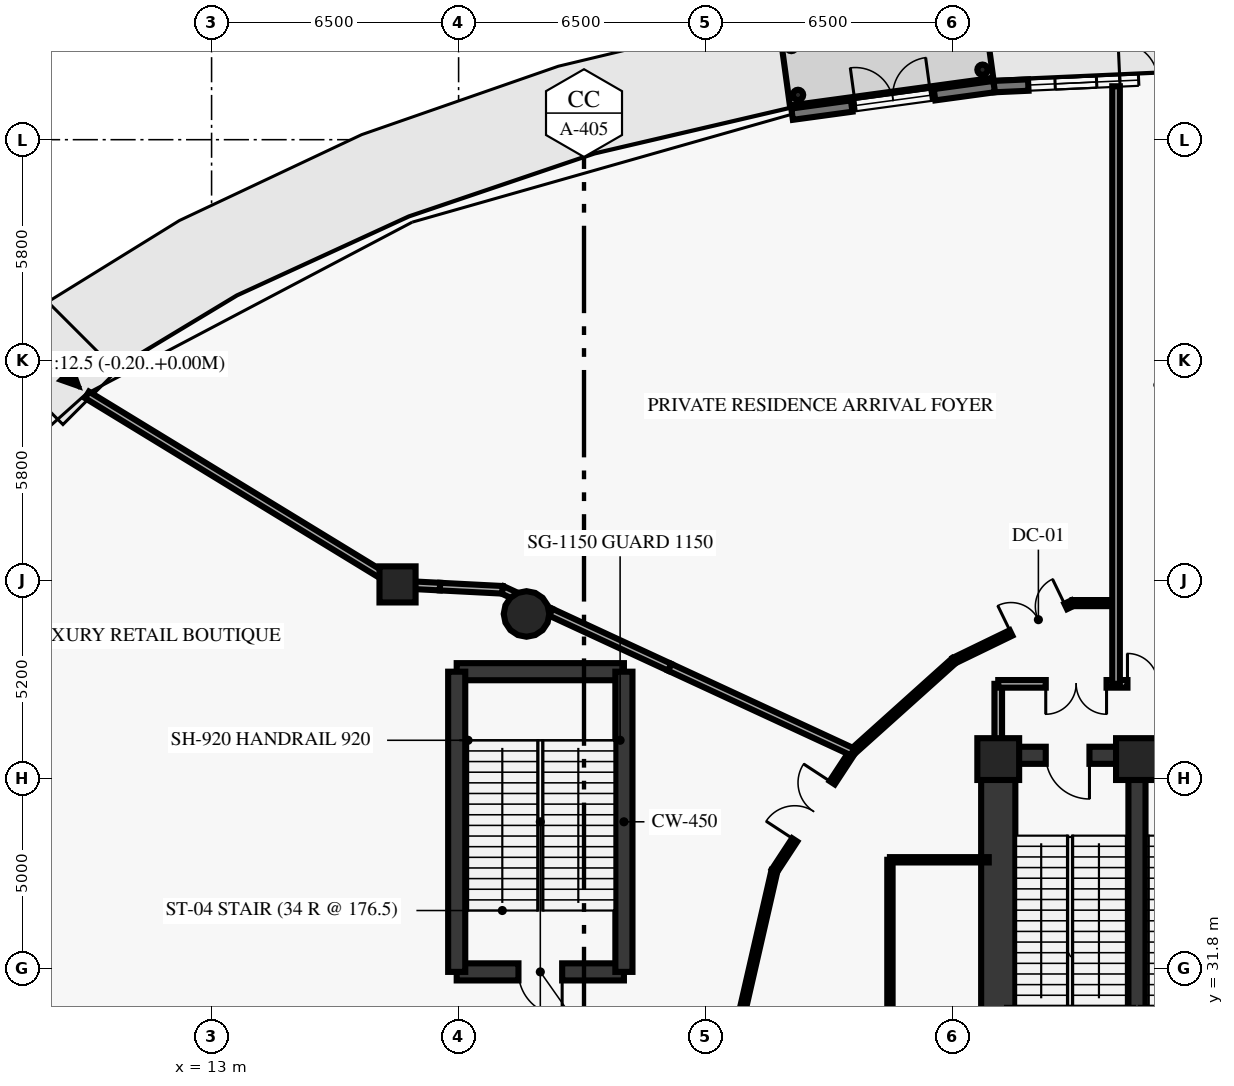
"""IFC4 building model, lengths in metres.
Left out: names, types, materials, properties, quantities, classifications, styles, units other than length and angle.
Written with IfcOpenShell. Run it as: python <this file> out.ifc"""

import sys

from ifc_helpers import new_model, si_unit, direction, frame, frame_2d, origin, origin_2d, place, context, subcontext, project, spatial, rectangle, circle, hollow_circle, extrude, element, fill, save


model = new_model("IFC4")
c1 = context("Model", 3, precision=1e-05, world=origin(), true_north=direction((0.0, 1.0)))
c2 = subcontext(c1, "Body", "Model", "MODEL_VIEW")
j1 = project(units=[si_unit("LENGTHUNIT", "METRE"), si_unit("PLANEANGLEUNIT", "RADIAN")], contexts=[c1])
p1 = place(None, origin())
s1 = spatial("IfcSite", under=j1, at=p1, CompositionType="ELEMENT")
p2 = place(p1, origin())
s2 = spatial("IfcBuilding", under=s1, at=p2, CompositionType="ELEMENT")
p3 = place(p2, origin())
s3 = spatial("IfcBuildingStorey", under=s2, at=p3, CompositionType="ELEMENT", Elevation=0.0)
for number, where, z_axis, x_axis in (
    (1, (37.35, 37.3, 0.0), (0.0, 0.0, 1.0), (1.0, 0.0, 0.0)),
    (2, (33.7, 37.3, 0.0), (0.0, 0.0, 1.0), (1.0, 0.0, 0.0)),
):
    element("IfcColumn", number, at=place(p3, frame(where, z_axis=z_axis, x_axis=x_axis)), inside=s3, PredefinedType="PILASTER", context=c2, shape_type="SweptSolid", body=[
        extrude(rectangle(XDim=1.1, YDim=1.1, at=origin_2d()), origin(), (0.0, 0.0, 1.0), 5.7),
    ])
p4 = place(p3, frame((21.287, 41.119, 0.0), z_axis=(0.0, 0.0, 1.0), x_axis=(1.0, 0.0, 0.0)))
e3 = element("IfcColumn", 3, at=p4, inside=s3, PredefinedType="COLUMN", context=c2, shape_type="SweptSolid", body=[
    extrude(circle(Radius=0.6, at=origin_2d()), origin(), (0.0, 0.0, 1.0), 5.7),
])
p5 = place(p3, frame((17.893, 41.897, 0.0), z_axis=(0.0, 0.0, 1.0), x_axis=(1.0, 0.0, 0.0)))
e4 = element("IfcColumn", 4, at=p5, inside=s3, PredefinedType="COLUMN", context=c2, shape_type="SweptSolid", body=[
    extrude(rectangle(XDim=0.95, YDim=0.95, at=origin_2d()), origin(), (0.0, 0.0, 1.0), 5.7),
])
p6 = place(p3, frame((33.7, 29.05, 0.0), z_axis=(0.0, 0.0, 1.0), x_axis=(0.0, 1.0, 0.0)))
e5 = element("IfcWall", 5, at=p6, inside=s3, PredefinedType="SHEAR", context=c2, shape_type="SweptSolid", body=[
    extrude(rectangle(XDim=8.35, YDim=0.9, at=frame_2d((4.175, 0.0))), origin(), (0.0, 0.0, 1.0), 5.7),
])
p7 = place(p3, frame((33.591, 54.997, 0.0), z_axis=(0.0, 0.0, 1.0), x_axis=(0.998993030562, 0.044865631479, 0.0)))
e6 = element("IfcWall", 6, at=p7, inside=s3, PredefinedType="STANDARD", context=c2, shape_type="SweptSolid", body=[
    extrude(rectangle(XDim=5.414, YDim=0.3, at=frame_2d((2.707, 0.0))), origin(), (0.0, 0.0, 1.0), 5.7),
])
p8 = place(p7, frame((0.9, 0.0, 0.9)))
e7 = element("IfcOpeningElement", 7, at=p8, cuts=e6, PredefinedType="OPENING", context=c2, shape_type="SweptSolid", body=[
    extrude(rectangle(XDim=1.8, YDim=2.4, at=frame_2d((0.9, 1.2))), frame((0.0, 0.16, 0.0), z_axis=(0.0, -1.0, 0.0), x_axis=(1.0, 0.0, 0.0)), (0.0, 0.0, 1.0), 0.32),
])
p9 = place(p7, frame((3.312, 0.0, 0.0)))
e8 = element("IfcOpeningElement", 8, at=p9, cuts=e6, PredefinedType="OPENING", context=c2, shape_type="SweptSolid", body=[
    extrude(rectangle(XDim=2.0, YDim=2.4, at=frame_2d((1.0, 1.2))), frame((0.0, 0.16, 0.0), z_axis=(0.0, -1.0, 0.0), x_axis=(1.0, 0.0, 0.0)), (0.0, 0.0, 1.0), 0.32),
])
p10 = place(p7, frame((1.607, 0.0, 3.4)))
e9 = element("IfcOpeningElement", 9, at=p10, cuts=e6, PredefinedType="OPENING", context=c2, shape_type="SweptSolid", body=[
    extrude(rectangle(XDim=2.2, YDim=1.3, at=frame_2d((1.1, 0.65))), frame((0.0, 0.16, 0.0), z_axis=(0.0, -1.0, 0.0), x_axis=(1.0, 0.0, 0.0)), (0.0, 0.0, 1.0), 0.32),
])
p11 = place(p3, frame((28.275, 54.271, 0.0), z_axis=(0.0, 0.0, 1.0), x_axis=(0.99080162659, 0.135322343857, 0.0)))
e10 = element("IfcWall", 10, at=p11, inside=s3, PredefinedType="STANDARD", context=c2, shape_type="SweptSolid", body=[
    extrude(rectangle(XDim=5.365, YDim=0.3, at=frame_2d((2.683, 0.0))), origin(), (0.0, 0.0, 1.0), 5.7),
])
p12 = place(p11, frame((1.683, 0.0, 0.0)))
e11 = element("IfcOpeningElement", 11, at=p12, cuts=e10, PredefinedType="OPENING", context=c2, shape_type="SweptSolid", body=[
    extrude(rectangle(XDim=2.0, YDim=2.4, at=frame_2d((1.0, 1.2))), frame((0.0, 0.16, 0.0), z_axis=(0.0, -1.0, 0.0), x_axis=(1.0, 0.0, 0.0)), (0.0, 0.0, 1.0), 0.32),
])
p13 = place(p11, frame((1.583, 0.0, 3.4)))
e12 = element("IfcOpeningElement", 12, at=p13, cuts=e10, PredefinedType="OPENING", context=c2, shape_type="SweptSolid", body=[
    extrude(rectangle(XDim=2.2, YDim=1.3, at=frame_2d((1.1, 0.65))), frame((0.0, 0.16, 0.0), z_axis=(0.0, -1.0, 0.0), x_axis=(1.0, 0.0, 0.0)), (0.0, 0.0, 1.0), 0.32),
])
for number, where, z_axis, x_axis in (
    (13, (33.286, 55.441, -0.22), (0.0, 0.0, 1.0), (1.0, 0.0, 0.0)),
    (14, (28.431, 54.778, -0.22), (0.0, 0.0, 1.0), (1.0, 0.0, 0.0)),
):
    element("IfcColumn", number, at=place(p3, frame(where, z_axis=z_axis, x_axis=x_axis)), inside=s3, PredefinedType="COLUMN", context=c2, shape_type="SweptSolid", body=[
        extrude(hollow_circle(Radius=0.136, WallThickness=0.013, at=origin_2d()), origin(), (0.0, 0.0, 1.0), 3.47),
    ])
p14 = place(p3, frame((33.7, 37.4, 0.0), z_axis=(0.0, 0.0, 1.0), x_axis=(1.0, 0.0, 0.0)))
e15 = element("IfcWall", 15, at=p14, inside=s3, PredefinedType="SHEAR", context=c2, shape_type="SweptSolid", body=[
    extrude(rectangle(XDim=3.65, YDim=0.45, at=frame_2d((1.825, 0.0))), origin(), (0.0, 0.0, 1.0), 5.7),
])
p15 = place(p14, frame((1.25, 0.0, 0.0)))
e16 = element("IfcOpeningElement", 16, at=p15, cuts=e15, PredefinedType="OPENING", context=c2, shape_type="SweptSolid", body=[
    extrude(rectangle(XDim=1.15, YDim=2.15, at=frame_2d((0.575, 1.075))), frame((0.0, 0.235, 0.0), z_axis=(0.0, -1.0, 0.0), x_axis=(1.0, 0.0, 0.0)), (0.0, 0.0, 1.0), 0.47),
])
p16 = place(p3, frame((37.35, 29.05, 0.0), z_axis=(0.0, 0.0, 1.0), x_axis=(0.0, 1.0, 0.0)))
e17 = element("IfcWall", 17, at=p16, inside=s3, PredefinedType="SHEAR", context=c2, shape_type="SweptSolid", body=[
    extrude(rectangle(XDim=8.35, YDim=0.45, at=frame_2d((4.175, 0.0))), origin(), (0.0, 0.0, 1.0), 5.7),
])
p17 = place(p3, frame((37.35, 37.4, 0.0), z_axis=(0.0, 0.0, 1.0), x_axis=(1.0, 0.0, 0.0)))
e18 = element("IfcWall", 18, at=p17, inside=s3, PredefinedType="SHEAR", context=c2, shape_type="SweptSolid", body=[
    extrude(rectangle(XDim=3.3, YDim=0.45, at=frame_2d((1.65, 0.0))), origin(), (0.0, 0.0, 1.0), 5.7),
])
p18 = place(p17, frame((1.075, 0.0, 0.0)))
e19 = element("IfcOpeningElement", 19, at=p18, cuts=e18, PredefinedType="OPENING", context=c2, shape_type="SweptSolid", body=[
    extrude(rectangle(XDim=1.15, YDim=2.15, at=frame_2d((0.575, 1.075))), frame((0.0, 0.235, 0.0), z_axis=(0.0, -1.0, 0.0), x_axis=(1.0, 0.0, 0.0)), (0.0, 0.0, 1.0), 0.47),
])
p19 = place(p3, frame((23.85, 31.7, 0.0), z_axis=(0.0, 0.0, 1.0), x_axis=(-1.0, 0.0, 0.0)))
e20 = element("IfcWall", 20, at=p19, inside=s3, PredefinedType="SHEAR", context=c2, shape_type="SweptSolid", body=[
    extrude(rectangle(XDim=4.4, YDim=0.45, at=frame_2d((2.2, 0.0))), origin(), (0.0, 0.0, 1.0), 5.7),
])
p20 = place(p19, frame((1.625, 0.0, 0.0)))
e21 = element("IfcOpeningElement", 21, at=p20, cuts=e20, PredefinedType="OPENING", context=c2, shape_type="SweptSolid", body=[
    extrude(rectangle(XDim=1.15, YDim=2.15, at=frame_2d((0.575, 1.075))), frame((0.0, 0.235, 0.0), z_axis=(0.0, -1.0, 0.0), x_axis=(1.0, 0.0, 0.0)), (0.0, 0.0, 1.0), 0.47),
])
p21 = place(p3, frame((19.45, 39.6, 0.0), z_axis=(0.0, 0.0, 1.0), x_axis=(1.0, 0.0, 0.0)))
e22 = element("IfcWall", 22, at=p21, inside=s3, PredefinedType="SHEAR", context=c2, shape_type="SweptSolid", body=[
    extrude(rectangle(XDim=4.4, YDim=0.45, at=frame_2d((2.2, 0.0))), origin(), (0.0, 0.0, 1.0), 5.7),
])
for number, where, z_axis, x_axis in (
    (23, (19.45, 31.7, 0.0), (0.0, 0.0, 1.0), (0.0, 1.0, 0.0)),
    (24, (23.85, 31.7, 0.0), (0.0, 0.0, 1.0), (0.0, 1.0, 0.0)),
):
    element("IfcWall", number, at=place(p3, frame(where, z_axis=z_axis, x_axis=x_axis)), inside=s3, PredefinedType="SHEAR", context=c2, shape_type="SweptSolid", body=[
        extrude(rectangle(XDim=7.9, YDim=0.45, at=frame_2d((3.95, 0.0))), origin(), (0.0, 0.0, 1.0), 5.7),
    ])
p22 = place(p3, frame((33.7, 37.4, 0.0), z_axis=(0.0, 0.0, 1.0), x_axis=(0.0, 1.0, 0.0)))
e25 = element("IfcWall", 25, at=p22, inside=s3, PredefinedType="SOLIDWALL", context=c2, shape_type="SweptSolid", body=[
    extrude(rectangle(XDim=1.88, YDim=0.2, at=frame_2d((0.94, 0.0))), origin(), (0.0, 0.0, 1.0), 5.7),
])
p23 = place(p3, frame((33.7, 39.28, 0.0), z_axis=(0.0, 0.0, 1.0), x_axis=(1.0, 0.0, 0.0)))
e26 = element("IfcWall", 26, at=p23, inside=s3, PredefinedType="SOLIDWALL", context=c2, shape_type="SweptSolid", body=[
    extrude(rectangle(XDim=5.2, YDim=0.2, at=frame_2d((2.6, 0.0))), origin(), (0.0, 0.0, 1.0), 5.7),
])
p24 = place(p23, frame((1.25, 0.0, 0.0)))
e27 = element("IfcOpeningElement", 27, at=p24, cuts=e26, PredefinedType="OPENING", context=c2, shape_type="SweptSolid", body=[
    extrude(rectangle(XDim=1.6, YDim=2.2, at=frame_2d((0.8, 1.1))), frame((0.0, 0.11, 0.0), z_axis=(0.0, -1.0, 0.0), x_axis=(1.0, 0.0, 0.0)), (0.0, 0.0, 1.0), 0.22),
])
p25 = place(p23, frame((3.4, 0.0, 0.0)))
e28 = element("IfcOpeningElement", 28, at=p25, cuts=e26, PredefinedType="OPENING", context=c2, shape_type="SweptSolid", body=[
    extrude(rectangle(XDim=1.6, YDim=2.2, at=frame_2d((0.8, 1.1))), frame((0.0, 0.11, 0.0), z_axis=(0.0, -1.0, 0.0), x_axis=(1.0, 0.0, 0.0)), (0.0, 0.0, 1.0), 0.22),
])
p26 = place(p3, frame((30.85, 34.65, 0.0), z_axis=(0.0, 0.0, 1.0), x_axis=(1.0, 0.0, 0.0)))
e29 = element("IfcWall", 29, at=p26, inside=s3, PredefinedType="PARTITIONING", context=c2, shape_type="SweptSolid", body=[
    extrude(rectangle(XDim=2.6, YDim=0.14, at=frame_2d((1.3, 0.0))), origin(), (0.0, 0.0, 1.0), 5.7),
])
p27 = place(p3, frame((30.85, 29.05, 0.0), z_axis=(0.0, 0.0, 1.0), x_axis=(0.0, 1.0, 0.0)))
e30 = element("IfcWall", 30, at=p27, inside=s3, PredefinedType="PARTITIONING", context=c2, shape_type="SweptSolid", body=[
    extrude(rectangle(XDim=5.6, YDim=0.14, at=frame_2d((2.8, 0.0))), origin(), (0.0, 0.0, 1.0), 5.7),
])
p28 = place(p3, frame((32.54, 39.894, 0.0), z_axis=(0.0, 0.0, 1.0), x_axis=(0.899789784655, 0.436323668199, 0.0)))
e31 = element("IfcWall", 31, at=p28, inside=s3, PredefinedType="PARTITIONING", context=c2, shape_type="SweptSolid", body=[
    extrude(rectangle(XDim=3.463, YDim=0.16, at=frame_2d((1.731, 0.0))), origin(), (0.0, 0.0, 1.0), 5.7),
])
p29 = place(p28, frame((1.663, 0.0, 0.0)))
e32 = element("IfcOpeningElement", 32, at=p29, cuts=e31, PredefinedType="OPENING", context=c2, shape_type="SweptSolid", body=[
    extrude(rectangle(XDim=1.6, YDim=2.2, at=frame_2d((0.8, 1.1))), frame((0.0, 0.09, 0.0), z_axis=(0.0, -1.0, 0.0), x_axis=(1.0, 0.0, 0.0)), (0.0, 0.0, 1.0), 0.18),
])
p30 = place(p3, frame((32.54, 39.894, 0.0), z_axis=(0.0, 0.0, 1.0), x_axis=(-0.744032872127, -0.668143012531, 0.0)))
e33 = element("IfcWall", 33, at=p30, inside=s3, PredefinedType="PARTITIONING", context=c2, shape_type="SweptSolid", body=[
    extrude(rectangle(XDim=3.597, YDim=0.16, at=frame_2d((1.798, 0.0))), origin(), (0.0, 0.0, 1.0), 5.7),
])
p31 = place(p3, frame((27.811, 34.36, 0.0), z_axis=(0.0, 0.0, 1.0), x_axis=(0.548348738977, 0.836249759619, 0.0)))
e34 = element("IfcWall", 34, at=p31, inside=s3, PredefinedType="PARTITIONING", context=c2, shape_type="SweptSolid", body=[
    extrude(rectangle(XDim=3.744, YDim=0.16, at=frame_2d((1.872, 0.0))), origin(), (0.0, 0.0, 1.0), 5.7),
])
p32 = place(p31, frame((0.972, 0.0, 0.0)))
e35 = element("IfcOpeningElement", 35, at=p32, cuts=e34, PredefinedType="OPENING", context=c2, shape_type="SweptSolid", body=[
    extrude(rectangle(XDim=1.8, YDim=2.3, at=frame_2d((0.9, 1.15))), frame((0.0, 0.09, 0.0), z_axis=(0.0, -1.0, 0.0), x_axis=(1.0, 0.0, 0.0)), (0.0, 0.0, 1.0), 0.18),
])
p33 = place(p3, frame((27.811, 34.36, 0.0), z_axis=(0.0, 0.0, 1.0), x_axis=(-0.223185487206, -0.974775993909, 0.0)))
e36 = element("IfcWall", 36, at=p33, inside=s3, PredefinedType="PARTITIONING", context=c2, shape_type="SweptSolid", body=[
    extrude(rectangle(XDim=7.756, YDim=0.16, at=frame_2d((3.878, 0.0))), origin(), (0.0, 0.0, 1.0), 5.7),
])
p34 = place(p3, frame((29.864, 37.491, 0.0), z_axis=(0.0, 0.0, 1.0), x_axis=(-0.907524785669, 0.419998527851, 0.0)))
e37 = element("IfcWall", 37, at=p34, inside=s3, PredefinedType="PARTITIONING", context=c2, shape_type="SweptSolid", body=[
    extrude(rectangle(XDim=5.3, YDim=0.2, at=frame_2d((2.65, 0.0))), origin(), (0.0, 0.0, 1.0), 5.7),
])
p35 = place(p3, frame((25.054, 39.717, 0.0), z_axis=(0.0, 0.0, 1.0), x_axis=(-0.90747190463, 0.420112773321, 0.0)))
e38 = element("IfcWall", 38, at=p35, inside=s3, PredefinedType="PARTITIONING", context=c2, shape_type="SweptSolid", body=[
    extrude(rectangle(XDim=3.449, YDim=0.2, at=frame_2d((1.725, 0.0))), origin(), (0.0, 0.0, 1.0), 4.92),
])
p36 = place(p3, frame((21.924, 41.166, 0.0), z_axis=(0.0, 0.0, 1.0), x_axis=(-0.907622896373, 0.419786467124, 0.0)))
e39 = element("IfcWall", 39, at=p36, inside=s3, PredefinedType="PARTITIONING", context=c2, shape_type="SweptSolid", body=[
    extrude(rectangle(XDim=1.403, YDim=0.2, at=frame_2d((0.701, 0.0))), origin(), (0.0, 0.0, 1.0), 5.7),
])
p37 = place(p3, frame((20.651, 41.755, 0.0), z_axis=(0.0, 0.0, 1.0), x_axis=(-0.998685128887, 0.051264152576, 0.0)))
e40 = element("IfcWall", 40, at=p37, inside=s3, PredefinedType="PARTITIONING", context=c2, shape_type="SweptSolid", body=[
    extrude(rectangle(XDim=1.643, YDim=0.2, at=frame_2d((0.822, 0.0))), origin(), (0.0, 0.0, 1.0), 5.7),
])
p38 = place(p3, frame((19.01, 41.839, 0.0), z_axis=(0.0, 0.0, 1.0), x_axis=(-0.998660904733, 0.051733909163, 0.0)))
e41 = element("IfcWall", 41, at=p38, inside=s3, PredefinedType="PARTITIONING", context=c2, shape_type="SweptSolid", body=[
    extrude(rectangle(XDim=1.118, YDim=0.2, at=frame_2d((0.559, 0.0))), origin(), (0.0, 0.0, 1.0), 5.24),
])
p39 = place(p3, frame((17.893, 41.897, 0.0), z_axis=(0.0, 0.0, 1.0), x_axis=(-0.853534520774, 0.521036296093, 0.0)))
e42 = element("IfcWall", 42, at=p39, inside=s3, PredefinedType="PARTITIONING", context=c2, shape_type="SweptSolid", body=[
    extrude(rectangle(XDim=9.573, YDim=0.2, at=frame_2d((4.787, 0.0))), origin(), (0.0, 0.0, 1.0), 5.7),
])
p40 = place(p3, frame((36.8, 41.405, 0.0), z_axis=(0.0, 0.0, 1.0), x_axis=(-1.0, 0.0, 0.0)))
e43 = element("IfcWall", 43, at=p40, inside=s3, PredefinedType="PARTITIONING", context=c2, shape_type="SweptSolid", body=[
    extrude(rectangle(XDim=1.144, YDim=0.16, at=frame_2d((0.572, 0.0))), origin(), (0.0, 0.0, 1.0), 5.7),
])
p41 = place(p3, frame((36.8, 39.28, 0.0), z_axis=(0.0, 0.0, 1.0), x_axis=(0.0, 1.0, 0.0)))
e44 = element("IfcWall", 44, at=p41, inside=s3, PredefinedType="SOLIDWALL", context=c2, shape_type="SweptSolid", body=[
    extrude(rectangle(XDim=15.726, YDim=0.2, at=frame_2d((7.863, 0.0))), origin(), (0.0, 0.0, 1.0), 5.7),
])
p42 = place(p8, origin())
e45 = element("IfcWindow", 45, at=p42, inside=s3, PartitioningType="DOUBLE_PANEL_VERTICAL", PredefinedType="WINDOW", context=c2, shape_type="SweptSolid", body=[
    extrude(rectangle(XDim=1.8, YDim=2.4, at=frame_2d((0.9, 1.2))), frame((0.0, 0.03, 0.0), z_axis=(0.0, -1.0, 0.0), x_axis=(1.0, 0.0, 0.0)), (0.0, 0.0, 1.0), 0.06),
])
fill(e7, e45)
p43 = place(p9, origin())
e46 = element("IfcDoor", 46, at=p43, inside=s3, OperationType="DOUBLE_DOOR_SINGLE_SWING", PredefinedType="DOOR", context=c2, shape_type="SweptSolid", body=[
    extrude(rectangle(XDim=2.0, YDim=2.4, at=frame_2d((1.0, 1.2))), frame((0.0, 0.025, 0.0), z_axis=(0.0, -1.0, 0.0), x_axis=(1.0, 0.0, 0.0)), (0.0, 0.0, 1.0), 0.05),
])
fill(e8, e46)
p44 = place(p10, origin())
e47 = element("IfcWindow", 47, at=p44, inside=s3, PartitioningType="DOUBLE_PANEL_HORIZONTAL", PredefinedType="WINDOW", context=c2, shape_type="SweptSolid", body=[
    extrude(rectangle(XDim=2.2, YDim=1.3, at=frame_2d((1.1, 0.65))), frame((0.0, 0.03, 0.0), z_axis=(0.0, -1.0, 0.0), x_axis=(1.0, 0.0, 0.0)), (0.0, 0.0, 1.0), 0.06),
])
fill(e9, e47)
p45 = place(p12, origin())
e48 = element("IfcDoor", 48, at=p45, inside=s3, OperationType="DOUBLE_DOOR_SINGLE_SWING", PredefinedType="DOOR", context=c2, shape_type="SweptSolid", body=[
    extrude(rectangle(XDim=2.0, YDim=2.4, at=frame_2d((1.0, 1.2))), frame((0.0, 0.025, 0.0), z_axis=(0.0, -1.0, 0.0), x_axis=(1.0, 0.0, 0.0)), (0.0, 0.0, 1.0), 0.05),
])
fill(e11, e48)
p46 = place(p13, origin())
e49 = element("IfcWindow", 49, at=p46, inside=s3, PartitioningType="DOUBLE_PANEL_HORIZONTAL", PredefinedType="WINDOW", context=c2, shape_type="SweptSolid", body=[
    extrude(rectangle(XDim=2.2, YDim=1.3, at=frame_2d((1.1, 0.65))), frame((0.0, 0.03, 0.0), z_axis=(0.0, -1.0, 0.0), x_axis=(1.0, 0.0, 0.0)), (0.0, 0.0, 1.0), 0.06),
])
fill(e12, e49)
p47 = place(p15, origin())
e50 = element("IfcDoor", 50, at=p47, inside=s3, OperationType="SINGLE_SWING_RIGHT", PredefinedType="DOOR", context=c2, shape_type="SweptSolid", body=[
    extrude(rectangle(XDim=1.15, YDim=2.15, at=frame_2d((0.575, 1.075))), frame((0.0, 0.025, 0.0), z_axis=(0.0, -1.0, 0.0), x_axis=(1.0, 0.0, 0.0)), (0.0, 0.0, 1.0), 0.05),
])
fill(e16, e50)
p48 = place(p20, origin())
e51 = element("IfcDoor", 51, at=p48, inside=s3, OperationType="SINGLE_SWING_LEFT", PredefinedType="DOOR", context=c2, shape_type="SweptSolid", body=[
    extrude(rectangle(XDim=1.15, YDim=2.15, at=frame_2d((0.575, 1.075))), frame((0.0, 0.025, 0.0), z_axis=(0.0, -1.0, 0.0), x_axis=(1.0, 0.0, 0.0)), (0.0, 0.0, 1.0), 0.05),
])
fill(e21, e51)
p49 = place(p24, origin())
e52 = element("IfcDoor", 52, at=p49, inside=s3, OperationType="DOUBLE_DOOR_SINGLE_SWING", PredefinedType="DOOR", context=c2, shape_type="SweptSolid", body=[
    extrude(rectangle(XDim=1.6, YDim=2.2, at=frame_2d((0.8, 1.1))), frame((0.0, 0.025, 0.0), z_axis=(0.0, -1.0, 0.0), x_axis=(1.0, 0.0, 0.0)), (0.0, 0.0, 1.0), 0.05),
])
fill(e27, e52)
p50 = place(p25, origin())
e53 = element("IfcDoor", 53, at=p50, inside=s3, OperationType="DOUBLE_DOOR_SINGLE_SWING", PredefinedType="DOOR", context=c2, shape_type="SweptSolid", body=[
    extrude(rectangle(XDim=1.6, YDim=2.2, at=frame_2d((0.8, 1.1))), frame((0.0, 0.025, 0.0), z_axis=(0.0, -1.0, 0.0), x_axis=(1.0, 0.0, 0.0)), (0.0, 0.0, 1.0), 0.05),
])
fill(e28, e53)
p51 = place(p29, origin())
e54 = element("IfcDoor", 54, at=p51, inside=s3, OperationType="DOUBLE_DOOR_SINGLE_SWING", PredefinedType="DOOR", context=c2, shape_type="SweptSolid", body=[
    extrude(rectangle(XDim=1.6, YDim=2.2, at=frame_2d((0.8, 1.1))), frame((0.0, 0.025, 0.0), z_axis=(0.0, -1.0, 0.0), x_axis=(1.0, 0.0, 0.0)), (0.0, 0.0, 1.0), 0.05),
])
fill(e32, e54)
p52 = place(p32, origin())
e55 = element("IfcDoor", 55, at=p52, inside=s3, OperationType="DOUBLE_DOOR_SINGLE_SWING", PredefinedType="DOOR", context=c2, shape_type="SweptSolid", body=[
    extrude(rectangle(XDim=1.8, YDim=2.3, at=frame_2d((0.9, 1.15))), frame((0.0, 0.025, 0.0), z_axis=(0.0, -1.0, 0.0), x_axis=(1.0, 0.0, 0.0)), (0.0, 0.0, 1.0), 0.05),
])
fill(e35, e55)
save(model, sys.argv[1])
